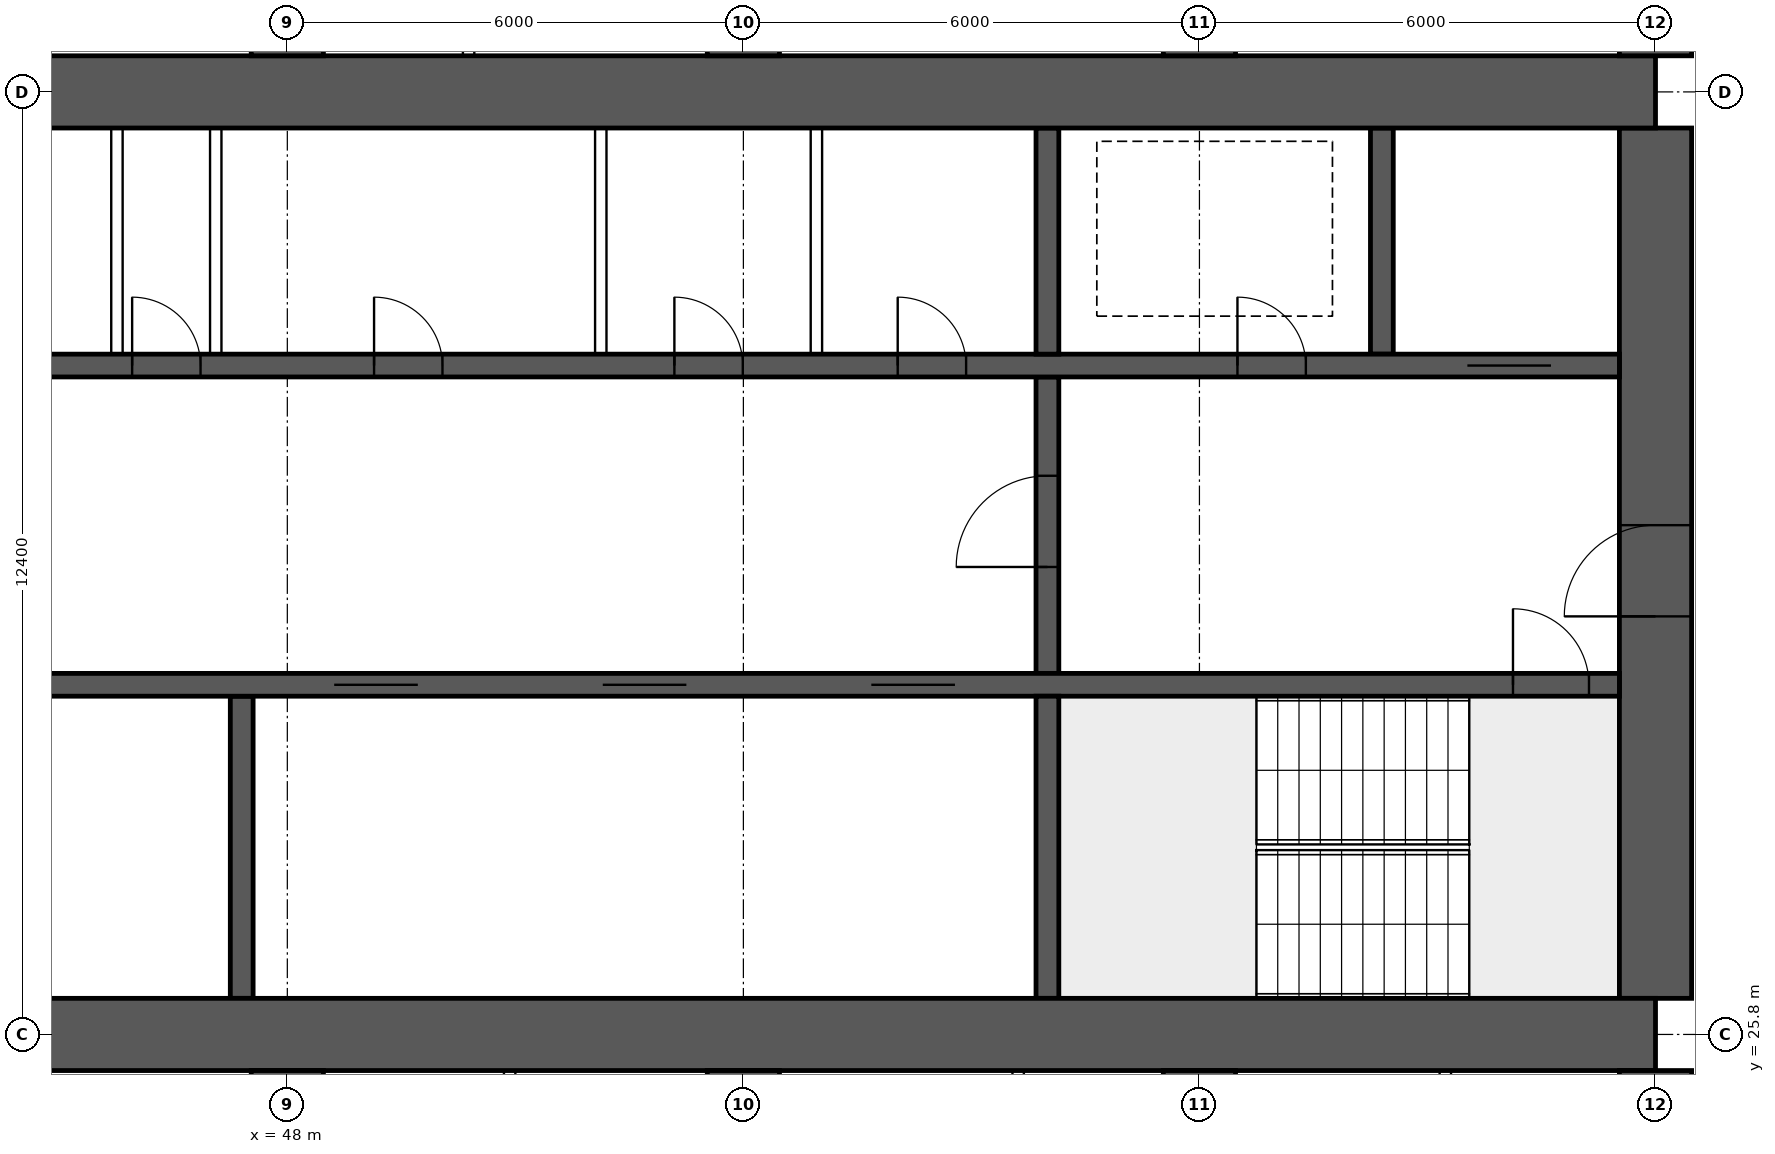
"""IFC4 building model, lengths in metres.
Left out: names, types, materials, properties, quantities, classifications, styles, units other than length and angle.
Written with IfcOpenShell. Run it as: python <this file> out.ifc"""

import sys

from ifc_helpers import new_model, si_unit, direction, frame, frame_2d, origin, place, context, subcontext, project, spatial, rectangle, extrude, element, fill, save


model = new_model("IFC4")
c1 = context("Model", 3, precision=1e-05, world=origin(), true_north=direction((0.0, 1.0)))
c2 = subcontext(c1, "Body", "Model", "MODEL_VIEW")
j1 = project(units=[si_unit("LENGTHUNIT", "METRE"), si_unit("PLANEANGLEUNIT", "RADIAN")], contexts=[c1])
p1 = place(None, origin())
s1 = spatial("IfcSite", under=j1, at=p1, CompositionType="ELEMENT")
p2 = place(p1, origin())
s2 = spatial("IfcBuilding", under=s1, at=p2, CompositionType="ELEMENT")
p3 = place(p2, frame((0.0, 0.0, 95.65)))
s3 = spatial("IfcBuildingStorey", under=s2, at=p3, CompositionType="ELEMENT", Elevation=95.65)
for number, where, z_axis, x_axis in (
    (1, (18.0, 25.8, 0.0), (0.0, 0.0, 1.0), (1.0, 0.0, 0.0)),
    (2, (18.0, 38.2, 0.0), (0.0, 0.0, 1.0), (1.0, 0.0, 0.0)),
):
    element("IfcWall", number, at=place(p3, frame(where, z_axis=z_axis, x_axis=x_axis)), inside=s3, PredefinedType="SHEAR", context=c2, shape_type="SweptSolid", body=[
        extrude(rectangle(XDim=48.0, YDim=0.95, at=frame_2d((24.0, 0.0))), origin(), (0.0, 0.0, 1.0), 3.75),
    ])
p4 = place(p3, frame((66.0, 26.275, 0.0), z_axis=(0.0, 0.0, 1.0), x_axis=(0.0, 1.0, 0.0)))
e3 = element("IfcWall", 3, at=p4, inside=s3, PredefinedType="SHEAR", context=c2, shape_type="SweptSolid", body=[
    extrude(rectangle(XDim=11.45, YDim=0.95, at=frame_2d((5.725, 0.0))), origin(), (0.0, 0.0, 1.0), 3.75),
])
p5 = place(p4, frame((5.025, 0.0, 0.0)))
e4 = element("IfcOpeningElement", 4, at=p5, cuts=e3, PredefinedType="OPENING", context=c2, shape_type="SweptSolid", body=[
    extrude(rectangle(XDim=1.2, YDim=2.1, at=frame_2d((0.6, 1.05))), frame((0.0, 0.485, 0.0), z_axis=(0.0, -1.0, 0.0), x_axis=(1.0, 0.0, 0.0)), (0.0, 0.0, 1.0), 0.97),
])
p6 = place(p3, frame((18.475, 30.4, 0.0), z_axis=(0.0, 0.0, 1.0), x_axis=(1.0, 0.0, 0.0)))
e5 = element("IfcWall", 5, at=p6, inside=s3, PredefinedType="SHEAR", context=c2, shape_type="SweptSolid", body=[
    extrude(rectangle(XDim=47.05, YDim=0.3, at=frame_2d((23.525, 0.0))), origin(), (0.0, 0.0, 1.0), 3.75),
])
p7 = place(p6, frame((0.4, 0.0, 0.0)))
e6 = element("IfcOpeningElement", 6, at=p7, cuts=e5, PredefinedType="OPENING", context=c2, shape_type="SweptSolid", body=[
    extrude(rectangle(XDim=1.0, YDim=2.1, at=frame_2d((0.5, 1.05))), frame((0.0, 0.16, 0.0), z_axis=(0.0, -1.0, 0.0), x_axis=(1.0, 0.0, 0.0)), (0.0, 0.0, 1.0), 0.32),
])
p8 = place(p6, frame((45.65, 0.0, 0.0)))
e7 = element("IfcOpeningElement", 7, at=p8, cuts=e5, PredefinedType="OPENING", context=c2, shape_type="SweptSolid", body=[
    extrude(rectangle(XDim=1.0, YDim=2.1, at=frame_2d((0.5, 1.05))), frame((0.0, 0.16, 0.0), z_axis=(0.0, -1.0, 0.0), x_axis=(1.0, 0.0, 0.0)), (0.0, 0.0, 1.0), 0.32),
])
p9 = place(p6, frame((8.275, 0.0, 0.0)))
e8 = element("IfcOpeningElement", 8, at=p9, cuts=e5, PredefinedType="OPENING", context=c2, shape_type="SweptSolid", body=[
    extrude(rectangle(XDim=1.1, YDim=2.1, at=frame_2d((0.55, 1.05))), frame((0.0, 0.16, 0.0), z_axis=(0.0, -1.0, 0.0), x_axis=(1.0, 0.0, 0.0)), (0.0, 0.0, 1.0), 0.32),
])
p10 = place(p6, frame((10.875, 0.0, 0.0)))
e9 = element("IfcOpeningElement", 9, at=p10, cuts=e5, PredefinedType="OPENING", context=c2, shape_type="SweptSolid", body=[
    extrude(rectangle(XDim=1.1, YDim=2.1, at=frame_2d((0.55, 1.05))), frame((0.0, 0.16, 0.0), z_axis=(0.0, -1.0, 0.0), x_axis=(1.0, 0.0, 0.0)), (0.0, 0.0, 1.0), 0.32),
])
p11 = place(p6, frame((13.475, 0.0, 0.0)))
e10 = element("IfcOpeningElement", 10, at=p11, cuts=e5, PredefinedType="OPENING", context=c2, shape_type="SweptSolid", body=[
    extrude(rectangle(XDim=1.1, YDim=2.1, at=frame_2d((0.55, 1.05))), frame((0.0, 0.16, 0.0), z_axis=(0.0, -1.0, 0.0), x_axis=(1.0, 0.0, 0.0)), (0.0, 0.0, 1.0), 0.32),
])
p12 = place(p6, frame((16.075, 0.0, 0.0)))
e11 = element("IfcOpeningElement", 11, at=p12, cuts=e5, PredefinedType="OPENING", context=c2, shape_type="SweptSolid", body=[
    extrude(rectangle(XDim=1.1, YDim=2.1, at=frame_2d((0.55, 1.05))), frame((0.0, 0.16, 0.0), z_axis=(0.0, -1.0, 0.0), x_axis=(1.0, 0.0, 0.0)), (0.0, 0.0, 1.0), 0.32),
])
p13 = place(p6, frame((18.85, 0.0, 0.0)))
e12 = element("IfcOpeningElement", 12, at=p13, cuts=e5, PredefinedType="OPENING", context=c2, shape_type="SweptSolid", body=[
    extrude(rectangle(XDim=0.9, YDim=2.1, at=frame_2d((0.45, 1.05))), frame((0.0, 0.16, 0.0), z_axis=(0.0, -1.0, 0.0), x_axis=(1.0, 0.0, 0.0)), (0.0, 0.0, 1.0), 0.32),
])
p14 = place(p6, frame((30.142, 0.0, 0.0)))
e13 = element("IfcOpeningElement", 13, at=p14, cuts=e5, PredefinedType="OPENING", context=c2, shape_type="SweptSolid", body=[
    extrude(rectangle(XDim=1.1, YDim=2.1, at=frame_2d((0.55, 1.05))), frame((0.0, 0.16, 0.0), z_axis=(0.0, -1.0, 0.0), x_axis=(1.0, 0.0, 0.0)), (0.0, 0.0, 1.0), 0.32),
])
p15 = place(p6, frame((33.675, 0.0, 0.0)))
e14 = element("IfcOpeningElement", 14, at=p15, cuts=e5, PredefinedType="OPENING", context=c2, shape_type="SweptSolid", body=[
    extrude(rectangle(XDim=1.1, YDim=2.1, at=frame_2d((0.55, 1.05))), frame((0.0, 0.16, 0.0), z_axis=(0.0, -1.0, 0.0), x_axis=(1.0, 0.0, 0.0)), (0.0, 0.0, 1.0), 0.32),
])
p16 = place(p6, frame((37.208, 0.0, 0.0)))
e15 = element("IfcOpeningElement", 15, at=p16, cuts=e5, PredefinedType="OPENING", context=c2, shape_type="SweptSolid", body=[
    extrude(rectangle(XDim=1.1, YDim=2.1, at=frame_2d((0.55, 1.05))), frame((0.0, 0.16, 0.0), z_axis=(0.0, -1.0, 0.0), x_axis=(1.0, 0.0, 0.0)), (0.0, 0.0, 1.0), 0.32),
])
p17 = place(p3, frame((18.475, 34.6, 0.0), z_axis=(0.0, 0.0, 1.0), x_axis=(1.0, 0.0, 0.0)))
e16 = element("IfcWall", 16, at=p17, inside=s3, PredefinedType="SHEAR", context=c2, shape_type="SweptSolid", body=[
    extrude(rectangle(XDim=47.05, YDim=0.3, at=frame_2d((23.525, 0.0))), origin(), (0.0, 0.0, 1.0), 3.75),
])
p18 = place(p17, frame((0.9, 0.0, 0.0)))
e17 = element("IfcOpeningElement", 17, at=p18, cuts=e16, PredefinedType="OPENING", context=c2, shape_type="SweptSolid", body=[
    extrude(rectangle(XDim=1.1, YDim=2.1, at=frame_2d((0.55, 1.05))), frame((0.0, 0.16, 0.0), z_axis=(0.0, -1.0, 0.0), x_axis=(1.0, 0.0, 0.0)), (0.0, 0.0, 1.0), 0.32),
])
p19 = place(p17, frame((45.05, 0.0, 0.0)))
e18 = element("IfcOpeningElement", 18, at=p19, cuts=e16, PredefinedType="OPENING", context=c2, shape_type="SweptSolid", body=[
    extrude(rectangle(XDim=1.1, YDim=2.1, at=frame_2d((0.55, 1.05))), frame((0.0, 0.16, 0.0), z_axis=(0.0, -1.0, 0.0), x_axis=(1.0, 0.0, 0.0)), (0.0, 0.0, 1.0), 0.32),
])
p20 = place(p17, frame((4.125, 0.0, 0.0)))
e19 = element("IfcOpeningElement", 19, at=p20, cuts=e16, PredefinedType="OPENING", context=c2, shape_type="SweptSolid", body=[
    extrude(rectangle(XDim=0.9, YDim=2.1, at=frame_2d((0.45, 1.05))), frame((0.0, 0.16, 0.0), z_axis=(0.0, -1.0, 0.0), x_axis=(1.0, 0.0, 0.0)), (0.0, 0.0, 1.0), 0.32),
])
p21 = place(p17, frame((42.025, 0.0, 0.0)))
e20 = element("IfcOpeningElement", 20, at=p21, cuts=e16, PredefinedType="OPENING", context=c2, shape_type="SweptSolid", body=[
    extrude(rectangle(XDim=0.9, YDim=2.1, at=frame_2d((0.45, 1.05))), frame((0.0, 0.16, 0.0), z_axis=(0.0, -1.0, 0.0), x_axis=(1.0, 0.0, 0.0)), (0.0, 0.0, 1.0), 0.32),
])
p22 = place(p17, frame((8.9, 0.0, 0.0)))
e21 = element("IfcOpeningElement", 21, at=p22, cuts=e16, PredefinedType="OPENING", context=c2, shape_type="SweptSolid", body=[
    extrude(rectangle(XDim=0.9, YDim=2.1, at=frame_2d((0.45, 1.05))), frame((0.0, 0.16, 0.0), z_axis=(0.0, -1.0, 0.0), x_axis=(1.0, 0.0, 0.0)), (0.0, 0.0, 1.0), 0.32),
])
p23 = place(p17, frame((12.874, 0.0, 0.0)))
e22 = element("IfcOpeningElement", 22, at=p23, cuts=e16, PredefinedType="OPENING", context=c2, shape_type="SweptSolid", body=[
    extrude(rectangle(XDim=0.9, YDim=2.1, at=frame_2d((0.45, 1.05))), frame((0.0, 0.16, 0.0), z_axis=(0.0, -1.0, 0.0), x_axis=(1.0, 0.0, 0.0)), (0.0, 0.0, 1.0), 0.32),
])
p24 = place(p17, frame((16.521, 0.0, 0.0)))
e23 = element("IfcOpeningElement", 23, at=p24, cuts=e16, PredefinedType="OPENING", context=c2, shape_type="SweptSolid", body=[
    extrude(rectangle(XDim=0.9, YDim=2.1, at=frame_2d((0.45, 1.05))), frame((0.0, 0.16, 0.0), z_axis=(0.0, -1.0, 0.0), x_axis=(1.0, 0.0, 0.0)), (0.0, 0.0, 1.0), 0.32),
])
p25 = place(p17, frame((20.28, 0.0, 0.0)))
e24 = element("IfcOpeningElement", 24, at=p25, cuts=e16, PredefinedType="OPENING", context=c2, shape_type="SweptSolid", body=[
    extrude(rectangle(XDim=0.9, YDim=2.1, at=frame_2d((0.45, 1.05))), frame((0.0, 0.16, 0.0), z_axis=(0.0, -1.0, 0.0), x_axis=(1.0, 0.0, 0.0)), (0.0, 0.0, 1.0), 0.32),
])
p26 = place(p17, frame((24.686, 0.0, 0.0)))
e25 = element("IfcOpeningElement", 25, at=p26, cuts=e16, PredefinedType="OPENING", context=c2, shape_type="SweptSolid", body=[
    extrude(rectangle(XDim=0.9, YDim=2.1, at=frame_2d((0.45, 1.05))), frame((0.0, 0.16, 0.0), z_axis=(0.0, -1.0, 0.0), x_axis=(1.0, 0.0, 0.0)), (0.0, 0.0, 1.0), 0.32),
])
p27 = place(p17, frame((27.483, 0.0, 0.0)))
e26 = element("IfcOpeningElement", 26, at=p27, cuts=e16, PredefinedType="OPENING", context=c2, shape_type="SweptSolid", body=[
    extrude(rectangle(XDim=0.9, YDim=2.1, at=frame_2d((0.45, 1.05))), frame((0.0, 0.16, 0.0), z_axis=(0.0, -1.0, 0.0), x_axis=(1.0, 0.0, 0.0)), (0.0, 0.0, 1.0), 0.32),
])
p28 = place(p17, frame((30.666, 0.0, 0.0)))
e27 = element("IfcOpeningElement", 27, at=p28, cuts=e16, PredefinedType="OPENING", context=c2, shape_type="SweptSolid", body=[
    extrude(rectangle(XDim=0.9, YDim=2.1, at=frame_2d((0.45, 1.05))), frame((0.0, 0.16, 0.0), z_axis=(0.0, -1.0, 0.0), x_axis=(1.0, 0.0, 0.0)), (0.0, 0.0, 1.0), 0.32),
])
p29 = place(p17, frame((34.617, 0.0, 0.0)))
e28 = element("IfcOpeningElement", 28, at=p29, cuts=e16, PredefinedType="OPENING", context=c2, shape_type="SweptSolid", body=[
    extrude(rectangle(XDim=0.9, YDim=2.1, at=frame_2d((0.45, 1.05))), frame((0.0, 0.16, 0.0), z_axis=(0.0, -1.0, 0.0), x_axis=(1.0, 0.0, 0.0)), (0.0, 0.0, 1.0), 0.32),
])
p30 = place(p17, frame((37.555, 0.0, 0.0)))
e29 = element("IfcOpeningElement", 29, at=p30, cuts=e16, PredefinedType="OPENING", context=c2, shape_type="SweptSolid", body=[
    extrude(rectangle(XDim=0.9, YDim=2.1, at=frame_2d((0.45, 1.05))), frame((0.0, 0.16, 0.0), z_axis=(0.0, -1.0, 0.0), x_axis=(1.0, 0.0, 0.0)), (0.0, 0.0, 1.0), 0.32),
])
p31 = place(p3, frame((58.0, 26.275, 0.0), z_axis=(0.0, 0.0, 1.0), x_axis=(0.0, 1.0, 0.0)))
e30 = element("IfcWall", 30, at=p31, inside=s3, PredefinedType="SHEAR", context=c2, shape_type="SweptSolid", body=[
    extrude(rectangle(XDim=3.975, YDim=0.3, at=frame_2d((1.988, 0.0))), origin(), (0.0, 0.0, 1.0), 3.75),
])
p32 = place(p3, frame((58.0, 30.55, 0.0), z_axis=(0.0, 0.0, 1.0), x_axis=(0.0, 1.0, 0.0)))
e31 = element("IfcWall", 31, at=p32, inside=s3, PredefinedType="SHEAR", context=c2, shape_type="SweptSolid", body=[
    extrude(rectangle(XDim=3.9, YDim=0.3, at=frame_2d((1.95, 0.0))), origin(), (0.0, 0.0, 1.0), 3.75),
])
p33 = place(p32, frame((1.4, 0.0, 0.0)))
e32 = element("IfcOpeningElement", 32, at=p33, cuts=e31, PredefinedType="OPENING", context=c2, shape_type="SweptSolid", body=[
    extrude(rectangle(XDim=1.2, YDim=2.1, at=frame_2d((0.6, 1.05))), frame((0.0, 0.16, 0.0), z_axis=(0.0, -1.0, 0.0), x_axis=(1.0, 0.0, 0.0)), (0.0, 0.0, 1.0), 0.32),
])
for number, where, z_axis, x_axis in (
    (33, (62.4, 34.75, 0.0), (0.0, 0.0, 1.0), (0.0, 1.0, 0.0)),
    (34, (58.0, 34.75, 0.0), (0.0, 0.0, 1.0), (0.0, 1.0, 0.0)),
):
    element("IfcWall", number, at=place(p3, frame(where, z_axis=z_axis, x_axis=x_axis)), inside=s3, PredefinedType="SHEAR", context=c2, shape_type="SweptSolid", body=[
        extrude(rectangle(XDim=2.975, YDim=0.3, at=frame_2d((1.488, 0.0))), origin(), (0.0, 0.0, 1.0), 3.75),
    ])
p34 = place(p3, frame((47.4, 26.275, 0.0), z_axis=(0.0, 0.0, 1.0), x_axis=(0.0, 1.0, 0.0)))
e35 = element("IfcWall", 35, at=p34, inside=s3, PredefinedType="SHEAR", context=c2, shape_type="SweptSolid", body=[
    extrude(rectangle(XDim=3.975, YDim=0.3, at=frame_2d((1.988, 0.0))), origin(), (0.0, 0.0, 1.0), 3.75),
])
for number, where, z_axis, x_axis in (
    (36, (48.0, 16.0, 0.0), (0.0, 0.0, 1.0), (0.0, 1.0, 0.0)),
    (37, (48.0, 38.675, 0.0), (0.0, 0.0, 1.0), (0.0, 1.0, 0.0)),
    (38, (54.0, 16.0, 0.0), (0.0, 0.0, 1.0), (0.0, 1.0, 0.0)),
    (39, (54.0, 38.675, 0.0), (0.0, 0.0, 1.0), (0.0, 1.0, 0.0)),
    (40, (60.0, 16.0, 0.0), (0.0, 0.0, 1.0), (0.0, 1.0, 0.0)),
    (41, (60.0, 38.675, 0.0), (0.0, 0.0, 1.0), (0.0, 1.0, 0.0)),
    (42, (66.0, 16.0, 0.0), (0.0, 0.0, 1.0), (0.0, 1.0, 0.0)),
    (43, (66.0, 38.675, 0.0), (0.0, 0.0, 1.0), (0.0, 1.0, 0.0)),
):
    element("IfcWall", number, at=place(p3, frame(where, z_axis=z_axis, x_axis=x_axis)), inside=s3, PredefinedType="SHEAR", context=c2, shape_type="SweptSolid", body=[
        extrude(rectangle(XDim=9.325, YDim=0.95, at=frame_2d((4.663, 0.0))), origin(), (0.0, 0.0, 1.0), 3.75),
    ])
for number, where, z_axis, x_axis in (
    (44, (45.758, 34.75, 0.0), (0.0, 0.0, 1.0), (0.0, 1.0, 0.0)),
    (45, (47.058, 34.75, 0.0), (0.0, 0.0, 1.0), (0.0, 1.0, 0.0)),
    (46, (52.124, 34.75, 0.0), (0.0, 0.0, 1.0), (0.0, 1.0, 0.0)),
    (47, (54.961, 34.75, 0.0), (0.0, 0.0, 1.0), (0.0, 1.0, 0.0)),
):
    element("IfcWall", number, at=place(p3, frame(where, z_axis=z_axis, x_axis=x_axis)), inside=s3, PredefinedType="SOLIDWALL", context=c2, shape_type="SweptSolid", body=[
        extrude(rectangle(XDim=2.975, YDim=0.15, at=frame_2d((1.488, 0.0))), origin(), (0.0, 0.0, 1.0), 3.3),
    ])
for number, where, z_axis, x_axis in (
    (48, (50.925, 16.1, 0.0), (0.0, 0.0, 1.0), (0.0, 1.0, 0.0)),
    (49, (57.615, 16.1, 0.0), (0.0, 0.0, 1.0), (0.0, 1.0, 0.0)),
    (50, (63.235, 16.1, 0.0), (0.0, 0.0, 1.0), (0.0, 1.0, 0.0)),
    (51, (50.385, 38.675, 0.0), (0.0, 0.0, 1.0), (0.0, 1.0, 0.0)),
):
    element("IfcWall", number, at=place(p3, frame(where, z_axis=z_axis, x_axis=x_axis)), inside=s3, PredefinedType="PARTITIONING", context=c2, shape_type="SweptSolid", body=[
        extrude(rectangle(XDim=9.225, YDim=0.15, at=frame_2d((4.612, 0.0))), origin(), (0.0, 0.0, 1.0), 3.3),
    ])
p35 = place(p5, origin())
e52 = element("IfcDoor", 52, at=p35, inside=s3, OperationType="SINGLE_SWING_LEFT", PredefinedType="DOOR", context=c2, shape_type="SweptSolid", body=[
    extrude(rectangle(XDim=1.2, YDim=2.1, at=frame_2d((0.6, 1.05))), frame((0.0, 0.025, 0.0), z_axis=(0.0, -1.0, 0.0), x_axis=(1.0, 0.0, 0.0)), (0.0, 0.0, 1.0), 0.05),
])
fill(e4, e52)
p36 = place(p8, origin())
e53 = element("IfcDoor", 53, at=p36, inside=s3, OperationType="SINGLE_SWING_LEFT", PredefinedType="DOOR", context=c2, shape_type="SweptSolid", body=[
    extrude(rectangle(XDim=1.0, YDim=2.1, at=frame_2d((0.5, 1.05))), frame((0.0, 0.025, 0.0), z_axis=(0.0, -1.0, 0.0), x_axis=(1.0, 0.0, 0.0)), (0.0, 0.0, 1.0), 0.05),
])
fill(e7, e53)
p37 = place(p19, origin())
e54 = element("IfcDoor", 54, at=p37, inside=s3, OperationType="DOUBLE_DOOR_SLIDING", PredefinedType="DOOR", context=c2, shape_type="SweptSolid", body=[
    extrude(rectangle(XDim=1.1, YDim=2.1, at=frame_2d((0.55, 1.05))), frame((0.0, 0.025, 0.0), z_axis=(0.0, -1.0, 0.0), x_axis=(1.0, 0.0, 0.0)), (0.0, 0.0, 1.0), 0.05),
])
fill(e18, e54)
p38 = place(p21, origin())
e55 = element("IfcDoor", 55, at=p38, inside=s3, OperationType="SINGLE_SWING_LEFT", PredefinedType="DOOR", context=c2, shape_type="SweptSolid", body=[
    extrude(rectangle(XDim=0.9, YDim=2.1, at=frame_2d((0.45, 1.05))), frame((0.0, 0.025, 0.0), z_axis=(0.0, -1.0, 0.0), x_axis=(1.0, 0.0, 0.0)), (0.0, 0.0, 1.0), 0.05),
])
fill(e20, e55)
p39 = place(p33, origin())
e56 = element("IfcDoor", 56, at=p39, inside=s3, OperationType="SINGLE_SWING_LEFT", PredefinedType="DOOR", context=c2, shape_type="SweptSolid", body=[
    extrude(rectangle(XDim=1.2, YDim=2.1, at=frame_2d((0.6, 1.05))), frame((0.0, 0.025, 0.0), z_axis=(0.0, -1.0, 0.0), x_axis=(1.0, 0.0, 0.0)), (0.0, 0.0, 1.0), 0.05),
])
fill(e32, e56)
p40 = place(p27, origin())
e57 = element("IfcDoor", 57, at=p40, inside=s3, OperationType="SINGLE_SWING_LEFT", PredefinedType="DOOR", context=c2, shape_type="SweptSolid", body=[
    extrude(rectangle(XDim=0.9, YDim=2.1, at=frame_2d((0.45, 1.05))), frame((0.0, 0.025, 0.0), z_axis=(0.0, -1.0, 0.0), x_axis=(1.0, 0.0, 0.0)), (0.0, 0.0, 1.0), 0.05),
])
fill(e26, e57)
p41 = place(p28, origin())
e58 = element("IfcDoor", 58, at=p41, inside=s3, OperationType="SINGLE_SWING_LEFT", PredefinedType="DOOR", context=c2, shape_type="SweptSolid", body=[
    extrude(rectangle(XDim=0.9, YDim=2.1, at=frame_2d((0.45, 1.05))), frame((0.0, 0.025, 0.0), z_axis=(0.0, -1.0, 0.0), x_axis=(1.0, 0.0, 0.0)), (0.0, 0.0, 1.0), 0.05),
])
fill(e27, e58)
p42 = place(p29, origin())
e59 = element("IfcDoor", 59, at=p42, inside=s3, OperationType="SINGLE_SWING_LEFT", PredefinedType="DOOR", context=c2, shape_type="SweptSolid", body=[
    extrude(rectangle(XDim=0.9, YDim=2.1, at=frame_2d((0.45, 1.05))), frame((0.0, 0.025, 0.0), z_axis=(0.0, -1.0, 0.0), x_axis=(1.0, 0.0, 0.0)), (0.0, 0.0, 1.0), 0.05),
])
fill(e28, e59)
p43 = place(p30, origin())
e60 = element("IfcDoor", 60, at=p43, inside=s3, OperationType="SINGLE_SWING_LEFT", PredefinedType="DOOR", context=c2, shape_type="SweptSolid", body=[
    extrude(rectangle(XDim=0.9, YDim=2.1, at=frame_2d((0.45, 1.05))), frame((0.0, 0.025, 0.0), z_axis=(0.0, -1.0, 0.0), x_axis=(1.0, 0.0, 0.0)), (0.0, 0.0, 1.0), 0.05),
])
fill(e29, e60)
p44 = place(p14, origin())
e61 = element("IfcDoor", 61, at=p44, inside=s3, OperationType="DOUBLE_DOOR_SLIDING", PredefinedType="DOOR", context=c2, shape_type="SweptSolid", body=[
    extrude(rectangle(XDim=1.1, YDim=2.1, at=frame_2d((0.55, 1.05))), frame((0.0, 0.025, 0.0), z_axis=(0.0, -1.0, 0.0), x_axis=(1.0, 0.0, 0.0)), (0.0, 0.0, 1.0), 0.05),
])
fill(e13, e61)
p45 = place(p15, origin())
e62 = element("IfcDoor", 62, at=p45, inside=s3, OperationType="DOUBLE_DOOR_SLIDING", PredefinedType="DOOR", context=c2, shape_type="SweptSolid", body=[
    extrude(rectangle(XDim=1.1, YDim=2.1, at=frame_2d((0.55, 1.05))), frame((0.0, 0.025, 0.0), z_axis=(0.0, -1.0, 0.0), x_axis=(1.0, 0.0, 0.0)), (0.0, 0.0, 1.0), 0.05),
])
fill(e14, e62)
p46 = place(p16, origin())
e63 = element("IfcDoor", 63, at=p46, inside=s3, OperationType="DOUBLE_DOOR_SLIDING", PredefinedType="DOOR", context=c2, shape_type="SweptSolid", body=[
    extrude(rectangle(XDim=1.1, YDim=2.1, at=frame_2d((0.55, 1.05))), frame((0.0, 0.025, 0.0), z_axis=(0.0, -1.0, 0.0), x_axis=(1.0, 0.0, 0.0)), (0.0, 0.0, 1.0), 0.05),
])
fill(e15, e63)
save(model, sys.argv[1])
